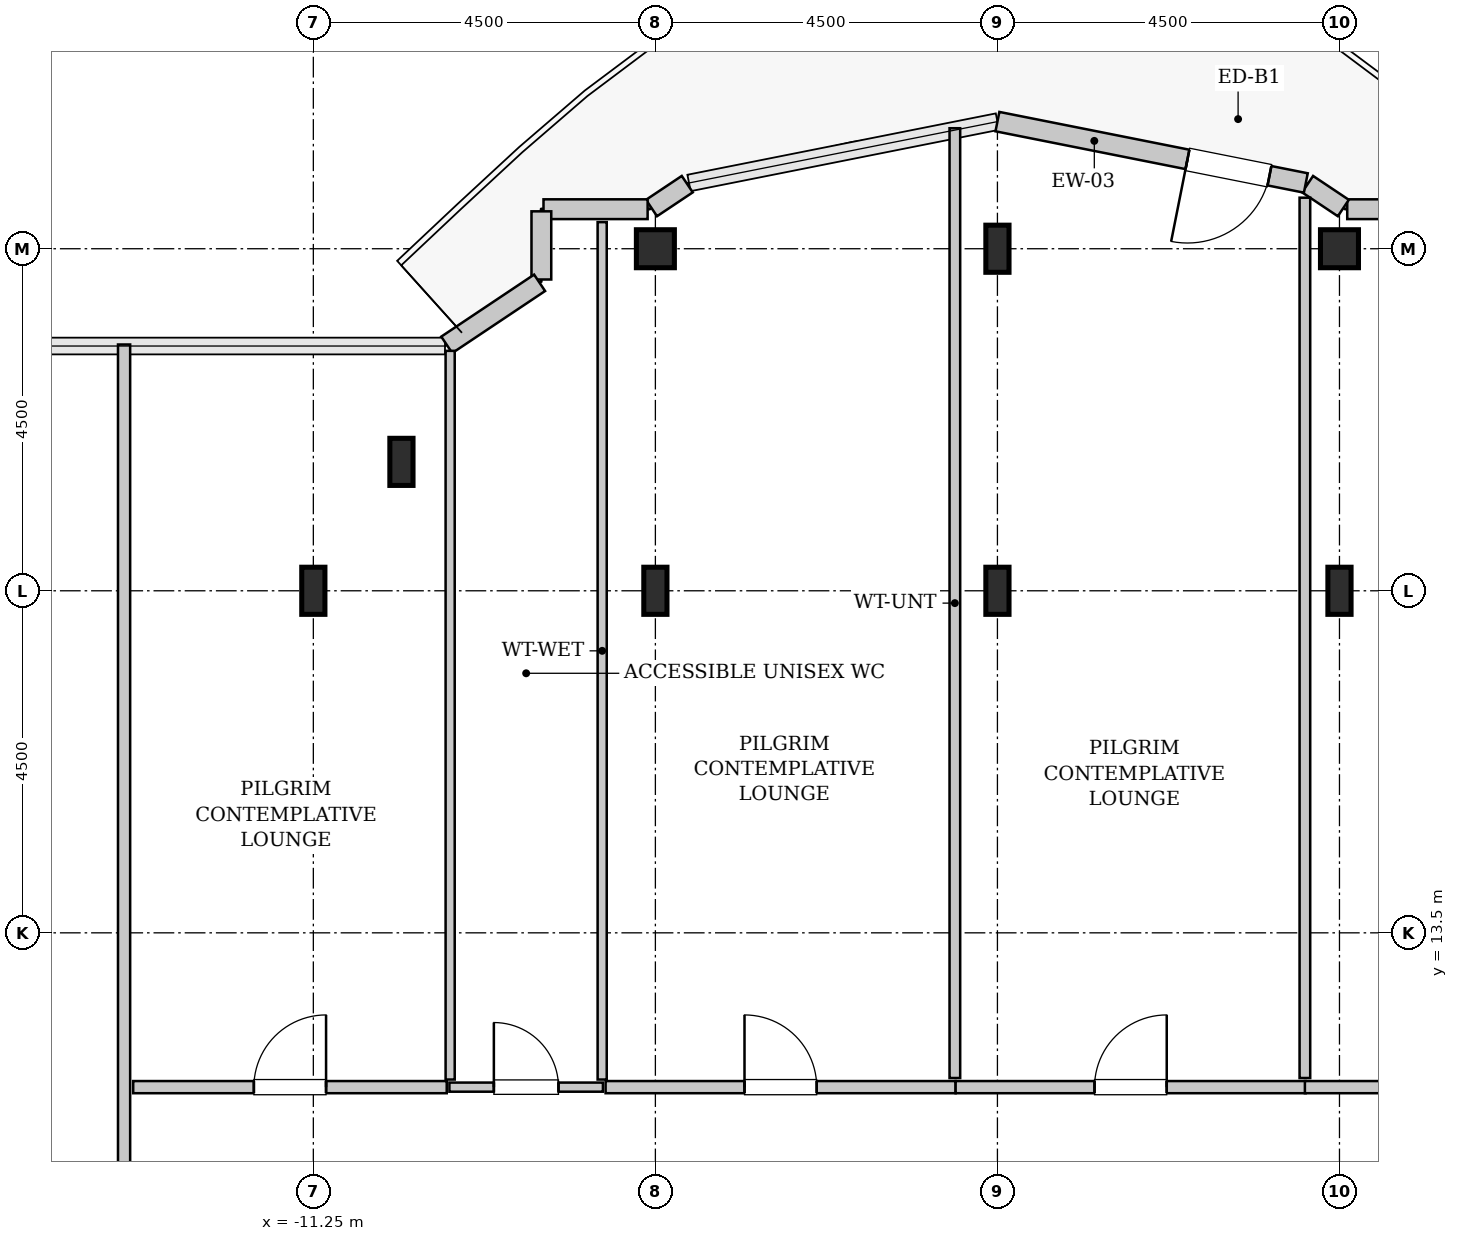
"""IFC4 building model, lengths in metres.
Left out: names, types, materials, properties, quantities, classifications, styles, units other than length and angle.
Written with IfcOpenShell. Run it as: python <this file> out.ifc"""

import sys

from ifc_helpers import new_model, si_unit, direction, frame, frame_2d, origin, origin_2d, place, context, subcontext, project, spatial, rectangle, hollow_rectangle, i_section, extrude, source, transform, mapped, element, fill, save


model = new_model("IFC4")
c1 = context("Model", 3, precision=1e-05, world=origin(), true_north=direction((0.0, 1.0)))
c2 = subcontext(c1, "Body", "Model", "MODEL_VIEW")
j1 = project(units=[si_unit("LENGTHUNIT", "METRE"), si_unit("PLANEANGLEUNIT", "RADIAN")], contexts=[c1])
p1 = place(None, origin())
s1 = spatial("IfcSite", under=j1, at=p1, CompositionType="ELEMENT")
p2 = place(p1, origin())
s2 = spatial("IfcBuilding", under=s1, at=p2, CompositionType="ELEMENT")
p3 = place(p2, frame((0.0, 0.0, 291.2)))
s3 = spatial("IfcBuildingStorey", under=s2, at=p3, CompositionType="ELEMENT", Elevation=291.2)
m1 = source(origin(), c2, "Body", "SweptSolid", [
    extrude(i_section(OverallWidth=0.305, OverallDepth=0.62, WebThickness=0.021, FlangeThickness=0.04, FilletRadius=0.027, at=origin_2d()), origin(), (0.0, 0.0, 1.0), 3.8),
])
for number, where, z_axis, x_axis in (
    (1, (-11.25, 18.0, 0.0), (0.0, 0.0, 1.0), (1.0, 0.0, 0.0)),
    (2, (-10.091, 19.696, 0.0), (0.0, 0.0, 1.0), (1.0, 0.0, 0.0)),
    (3, (-6.75, 18.0, 0.0), (0.0, 0.0, 1.0), (1.0, 0.0, 0.0)),
):
    element("IfcColumn", number, at=place(p3, frame(where, z_axis=z_axis, x_axis=x_axis)), inside=s3, PredefinedType="COLUMN", context=c2, shape_type="MappedRepresentation", body=[
        mapped(m1, transform((0.0, 0.0, 0.0), x_axis=(1.0, 0.0, 0.0), y_axis=(0.0, 1.0, 0.0), z_axis=(0.0, 0.0, 1.0), scale=1.0)),
    ])
m2 = source(origin(), c2, "Body", "SweptSolid", [
    extrude(hollow_rectangle(XDim=0.5, YDim=0.5, WallThickness=0.025, InnerFilletRadius=0.025, OuterFilletRadius=0.05, at=origin_2d()), origin(), (0.0, 0.0, 1.0), 3.8),
])
p4 = place(p3, frame((-6.75, 22.5, 0.0), z_axis=(0.0, 0.0, 1.0), x_axis=(1.0, 0.0, 0.0)))
e4 = element("IfcColumn", 4, at=p4, inside=s3, PredefinedType="COLUMN", context=c2, shape_type="MappedRepresentation", body=[
    mapped(m2, transform((0.0, 0.0, 0.0), x_axis=(1.0, 0.0, 0.0), y_axis=(0.0, 1.0, 0.0), z_axis=(0.0, 0.0, 1.0), scale=1.0)),
])
for number, where, z_axis, x_axis in (
    (5, (-2.25, 18.0, 0.0), (0.0, 0.0, 1.0), (1.0, 0.0, 0.0)),
    (6, (-2.25, 22.5, 0.0), (0.0, 0.0, 1.0), (1.0, 0.0, 0.0)),
    (7, (2.25, 18.0, 0.0), (0.0, 0.0, 1.0), (1.0, 0.0, 0.0)),
):
    element("IfcColumn", number, at=place(p3, frame(where, z_axis=z_axis, x_axis=x_axis)), inside=s3, PredefinedType="COLUMN", context=c2, shape_type="MappedRepresentation", body=[
        mapped(m1, transform((0.0, 0.0, 0.0), x_axis=(1.0, 0.0, 0.0), y_axis=(0.0, 1.0, 0.0), z_axis=(0.0, 0.0, 1.0), scale=1.0)),
    ])
p5 = place(p3, frame((2.25, 22.5, 0.0), z_axis=(0.0, 0.0, 1.0), x_axis=(1.0, 0.0, 0.0)))
e8 = element("IfcColumn", 8, at=p5, inside=s3, PredefinedType="COLUMN", context=c2, shape_type="MappedRepresentation", body=[
    mapped(m2, transform((0.0, 0.0, 0.0), x_axis=(1.0, 0.0, 0.0), y_axis=(0.0, 1.0, 0.0), z_axis=(0.0, 0.0, 1.0), scale=1.0)),
])
m3 = source(origin(), c2, "Body", "SweptSolid", [
    extrude(rectangle(XDim=1.37, YDim=0.26, at=frame_2d((0.685, 0.0))), origin(), (0.0, 0.0, 1.0), 3.55),
])
p6 = place(p3, frame((3.722, 23.02, 0.0), z_axis=(0.0, 0.0, 1.0), x_axis=(-1.0, 0.0, 0.0)))
e9 = element("IfcWall", 9, at=p6, inside=s3, PredefinedType="SOLIDWALL", context=c2, shape_type="MappedRepresentation", body=[
    mapped(m3, transform((0.0, 0.0, 0.0), x_axis=(1.0, 0.0, 0.0), y_axis=(0.0, 1.0, 0.0), z_axis=(0.0, 0.0, 1.0), scale=1.0)),
])
m4 = source(origin(), c2, "Body", "SweptSolid", [
    extrude(rectangle(XDim=0.565, YDim=0.26, at=frame_2d((0.283, 0.0))), origin(), (0.0, 0.0, 1.0), 3.55),
])
p7 = place(p3, frame((2.301, 23.036, 0.0), z_axis=(0.0, 0.0, 1.0), x_axis=(-0.831651492666, 0.555297933317, 0.0)))
e10 = element("IfcWall", 10, at=p7, inside=s3, PredefinedType="SOLIDWALL", context=c2, shape_type="MappedRepresentation", body=[
    mapped(m4, transform((0.0, 0.0, 0.0), x_axis=(1.0, 0.0, 0.0), y_axis=(0.0, 1.0, 0.0), z_axis=(0.0, 0.0, 1.0), scale=1.0)),
])
m5 = source(origin(), c2, "Body", "SweptSolid", [
    extrude(rectangle(XDim=4.137, YDim=0.26, at=frame_2d((2.068, 0.0))), origin(), (0.0, 0.0, 1.0), 3.55),
])
p8 = place(p3, frame((1.807, 23.365, 0.0), z_axis=(0.0, 0.0, 1.0), x_axis=(-0.980782170794, 0.195105954428, 0.0)))
e11 = element("IfcWall", 11, at=p8, inside=s3, PredefinedType="SOLIDWALL", context=c2, shape_type="MappedRepresentation", body=[
    mapped(m5, transform((0.0, 0.0, 0.0), x_axis=(1.0, 0.0, 0.0), y_axis=(0.0, 1.0, 0.0), z_axis=(0.0, 0.0, 1.0), scale=1.0)),
])
p9 = place(p8, frame((0.488, 0.0, 0.0)))
e12 = element("IfcOpeningElement", 12, at=p9, cuts=e11, PredefinedType="OPENING", context=c2, shape_type="SweptSolid", body=[
    extrude(rectangle(XDim=1.1, YDim=2.2, at=frame_2d((0.55, 1.1))), frame((0.0, 0.14, 0.0), z_axis=(0.0, -1.0, 0.0), x_axis=(1.0, 0.0, 0.0)), (0.0, 0.0, 1.0), 0.28),
])
p10 = place(p3, frame((-6.331, 23.35, 0.0), z_axis=(0.0, 0.0, 1.0), x_axis=(-0.831651492666, -0.555297933317, 0.0)))
e13 = element("IfcWall", 13, at=p10, inside=s3, PredefinedType="SOLIDWALL", context=c2, shape_type="MappedRepresentation", body=[
    mapped(m4, transform((0.0, 0.0, 0.0), x_axis=(1.0, 0.0, 0.0), y_axis=(0.0, 1.0, 0.0), z_axis=(0.0, 0.0, 1.0), scale=1.0)),
])
p11 = place(p3, frame((-6.852, 23.02, 0.0), z_axis=(0.0, 0.0, 1.0), x_axis=(-1.0, 0.0, 0.0)))
e14 = element("IfcWall", 14, at=p11, inside=s3, PredefinedType="SOLIDWALL", context=c2, shape_type="MappedRepresentation", body=[
    mapped(m3, transform((0.0, 0.0, 0.0), x_axis=(1.0, 0.0, 0.0), y_axis=(0.0, 1.0, 0.0), z_axis=(0.0, 0.0, 1.0), scale=1.0)),
])
m6 = source(origin(), c2, "Body", "SweptSolid", [
    extrude(rectangle(XDim=0.897, YDim=0.26, at=frame_2d((0.448, 0.0))), origin(), (0.0, 0.0, 1.0), 3.55),
])
p12 = place(p3, frame((-8.25, 22.992, 0.0), z_axis=(0.0, 0.0, 1.0), x_axis=(0.0, -1.0, 0.0)))
e15 = element("IfcWall", 15, at=p12, inside=s3, PredefinedType="SOLIDWALL", context=c2, shape_type="MappedRepresentation", body=[
    mapped(m6, transform((0.0, 0.0, 0.0), x_axis=(1.0, 0.0, 0.0), y_axis=(0.0, 1.0, 0.0), z_axis=(0.0, 0.0, 1.0), scale=1.0)),
])
m7 = source(origin(), c2, "Body", "SweptSolid", [
    extrude(rectangle(XDim=1.469, YDim=0.26, at=frame_2d((0.734, 0.0))), origin(), (0.0, 0.0, 1.0), 3.55),
])
p13 = place(p3, frame((-8.273, 22.052, 0.0), z_axis=(0.0, 0.0, 1.0), x_axis=(-0.831461760506, -0.555581983884, 0.0)))
e16 = element("IfcWall", 16, at=p13, inside=s3, PredefinedType="SOLIDWALL", context=c2, shape_type="MappedRepresentation", body=[
    mapped(m7, transform((0.0, 0.0, 0.0), x_axis=(1.0, 0.0, 0.0), y_axis=(0.0, 1.0, 0.0), z_axis=(0.0, 0.0, 1.0), scale=1.0)),
])
m8 = source(origin(), c2, "Body", "SweptSolid", [
    extrude(rectangle(XDim=2.02, YDim=0.12, at=frame_2d((1.01, 0.0))), origin(), (0.0, 0.0, 1.0), 3.535),
])
p14 = place(p3, frame((-9.46, 11.47, 0.0), z_axis=(0.0, 0.0, 1.0), x_axis=(1.0, 0.0, 0.0)))
e17 = element("IfcWall", 17, at=p14, inside=s3, PredefinedType="PLUMBINGWALL", context=c2, shape_type="MappedRepresentation", body=[
    mapped(m8, transform((0.0, 0.0, 0.0), x_axis=(1.0, 0.0, 0.0), y_axis=(0.0, 1.0, 0.0), z_axis=(0.0, 0.0, 1.0), scale=1.0)),
])
p15 = place(p14, frame((0.585, 0.0, 0.0)))
e18 = element("IfcOpeningElement", 18, at=p15, cuts=e17, PredefinedType="OPENING", context=c2, shape_type="SweptSolid", body=[
    extrude(rectangle(XDim=0.85, YDim=2.1, at=frame_2d((0.425, 1.05))), frame((0.0, 0.07, 0.0), z_axis=(0.0, -1.0, 0.0), x_axis=(1.0, 0.0, 0.0)), (0.0, 0.0, 1.0), 0.14),
])
m9 = source(origin(), c2, "Body", "SweptSolid", [
    extrude(rectangle(XDim=11.28, YDim=0.12, at=frame_2d((5.64, 0.0))), origin(), (0.0, 0.0, 1.0), 3.535),
])
p16 = place(p3, frame((-7.45, 11.57, 0.0), z_axis=(0.0, 0.0, 1.0), x_axis=(0.0, 1.0, 0.0)))
e19 = element("IfcWall", 19, at=p16, inside=s3, PredefinedType="PLUMBINGWALL", context=c2, shape_type="MappedRepresentation", body=[
    mapped(m9, transform((0.0, 0.0, 0.0), x_axis=(1.0, 0.0, 0.0), y_axis=(0.0, 1.0, 0.0), z_axis=(0.0, 0.0, 1.0), scale=1.0)),
])
m10 = source(origin(), c2, "Body", "SweptSolid", [
    extrude(rectangle(XDim=9.587, YDim=0.12, at=frame_2d((4.793, 0.0))), origin(), (0.0, 0.0, 1.0), 3.535),
])
p17 = place(p3, frame((-9.45, 11.57, 0.0), z_axis=(0.0, 0.0, 1.0), x_axis=(0.0, 1.0, 0.0)))
e20 = element("IfcWall", 20, at=p17, inside=s3, PredefinedType="PLUMBINGWALL", context=c2, shape_type="MappedRepresentation", body=[
    mapped(m10, transform((0.0, 0.0, 0.0), x_axis=(1.0, 0.0, 0.0), y_axis=(0.0, 1.0, 0.0), z_axis=(0.0, 0.0, 1.0), scale=1.0)),
])
m11 = source(origin(), c2, "Body", "SweptSolid", [
    extrude(rectangle(XDim=12.752, YDim=0.16, at=frame_2d((6.376, 0.0))), origin(), (0.0, 0.0, 1.0), 3.535),
])
p18 = place(p3, frame((-13.74, 8.488, 0.0), z_axis=(0.0, 0.0, 1.0), x_axis=(0.0, 1.0, 0.0)))
e21 = element("IfcWall", 21, at=p18, inside=s3, PredefinedType="PARTITIONING", context=c2, shape_type="MappedRepresentation", body=[
    mapped(m11, transform((0.0, 0.0, 0.0), x_axis=(1.0, 0.0, 0.0), y_axis=(0.0, 1.0, 0.0), z_axis=(0.0, 0.0, 1.0), scale=1.0)),
])
p19 = place(p18, frame((1.036, 0.0, 0.0)))
e22 = element("IfcOpeningElement", 22, at=p19, cuts=e21, PredefinedType="OPENING", context=c2, shape_type="SweptSolid", body=[
    extrude(rectangle(XDim=0.95, YDim=2.1, at=frame_2d((0.475, 1.05))), frame((0.0, 0.09, 0.0), z_axis=(0.0, -1.0, 0.0), x_axis=(1.0, 0.0, 0.0)), (0.0, 0.0, 1.0), 0.18),
])
m12 = source(origin(), c2, "Body", "SweptSolid", [
    extrude(rectangle(XDim=4.125, YDim=0.16, at=frame_2d((2.062, 0.0))), origin(), (0.0, 0.0, 1.0), 3.535),
])
p20 = place(p3, frame((-13.62, 11.47, 0.0), z_axis=(0.0, 0.0, 1.0), x_axis=(1.0, 0.0, 0.0)))
e23 = element("IfcWall", 23, at=p20, inside=s3, PredefinedType="PARTITIONING", context=c2, shape_type="MappedRepresentation", body=[
    mapped(m12, transform((0.0, 0.0, 0.0), x_axis=(1.0, 0.0, 0.0), y_axis=(0.0, 1.0, 0.0), z_axis=(0.0, 0.0, 1.0), scale=1.0)),
])
p21 = place(p20, frame((1.587, 0.0, 0.0)))
e24 = element("IfcOpeningElement", 24, at=p21, cuts=e23, PredefinedType="OPENING", context=c2, shape_type="SweptSolid", body=[
    extrude(rectangle(XDim=0.95, YDim=2.1, at=frame_2d((0.475, 1.05))), frame((0.0, 0.09, 0.0), z_axis=(0.0, -1.0, 0.0), x_axis=(1.0, 0.0, 0.0)), (0.0, 0.0, 1.0), 0.18),
])
m13 = source(origin(), c2, "Body", "SweptSolid", [
    extrude(rectangle(XDim=4.605, YDim=0.16, at=frame_2d((2.302, 0.0))), origin(), (0.0, 0.0, 1.0), 3.535),
])
p22 = place(p3, frame((-7.405, 11.47, 0.0), z_axis=(0.0, 0.0, 1.0), x_axis=(1.0, 0.0, 0.0)))
e25 = element("IfcWall", 25, at=p22, inside=s3, PredefinedType="PARTITIONING", context=c2, shape_type="MappedRepresentation", body=[
    mapped(m13, transform((0.0, 0.0, 0.0), x_axis=(1.0, 0.0, 0.0), y_axis=(0.0, 1.0, 0.0), z_axis=(0.0, 0.0, 1.0), scale=1.0)),
])
p23 = place(p22, frame((1.827, 0.0, 0.0)))
e26 = element("IfcOpeningElement", 26, at=p23, cuts=e25, PredefinedType="OPENING", context=c2, shape_type="SweptSolid", body=[
    extrude(rectangle(XDim=0.95, YDim=2.1, at=frame_2d((0.475, 1.05))), frame((0.0, 0.09, 0.0), z_axis=(0.0, -1.0, 0.0), x_axis=(1.0, 0.0, 0.0)), (0.0, 0.0, 1.0), 0.18),
])
m14 = source(origin(), c2, "Body", "SweptSolid", [
    extrude(rectangle(XDim=12.495, YDim=0.14, at=frame_2d((6.248, 0.0))), origin(), (0.0, 0.0, 1.0), 3.535),
])
p24 = place(p3, frame((-2.81, 11.59, 0.0), z_axis=(0.0, 0.0, 1.0), x_axis=(0.0, 1.0, 0.0)))
e27 = element("IfcWall", 27, at=p24, inside=s3, PredefinedType="PARTITIONING", context=c2, shape_type="MappedRepresentation", body=[
    mapped(m14, transform((0.0, 0.0, 0.0), x_axis=(1.0, 0.0, 0.0), y_axis=(0.0, 1.0, 0.0), z_axis=(0.0, 0.0, 1.0), scale=1.0)),
])
p25 = place(p3, frame((-2.8, 11.47, 0.0), z_axis=(0.0, 0.0, 1.0), x_axis=(1.0, 0.0, 0.0)))
e28 = element("IfcWall", 28, at=p25, inside=s3, PredefinedType="PARTITIONING", context=c2, shape_type="MappedRepresentation", body=[
    mapped(m13, transform((0.0, 0.0, 0.0), x_axis=(1.0, 0.0, 0.0), y_axis=(0.0, 1.0, 0.0), z_axis=(0.0, 0.0, 1.0), scale=1.0)),
])
p26 = place(p25, frame((1.827, 0.0, 0.0)))
e29 = element("IfcOpeningElement", 29, at=p26, cuts=e28, PredefinedType="OPENING", context=c2, shape_type="SweptSolid", body=[
    extrude(rectangle(XDim=0.95, YDim=2.1, at=frame_2d((0.475, 1.05))), frame((0.0, 0.09, 0.0), z_axis=(0.0, -1.0, 0.0), x_axis=(1.0, 0.0, 0.0)), (0.0, 0.0, 1.0), 0.18),
])
m15 = source(origin(), c2, "Body", "SweptSolid", [
    extrude(rectangle(XDim=11.581, YDim=0.14, at=frame_2d((5.791, 0.0))), origin(), (0.0, 0.0, 1.0), 2.925),
])
p27 = place(p3, frame((1.795, 11.59, 0.0), z_axis=(0.0, 0.0, 1.0), x_axis=(0.0, 1.0, 0.0)))
e30 = element("IfcWall", 30, at=p27, inside=s3, PredefinedType="PARTITIONING", context=c2, shape_type="MappedRepresentation", body=[
    mapped(m15, transform((0.0, 0.0, 0.0), x_axis=(1.0, 0.0, 0.0), y_axis=(0.0, 1.0, 0.0), z_axis=(0.0, 0.0, 1.0), scale=1.0)),
])
m16 = source(origin(), c2, "Body", "SweptSolid", [
    extrude(rectangle(XDim=6.01, YDim=0.16, at=frame_2d((3.005, 0.0))), origin(), (0.0, 0.0, 1.0), 3.535),
])
p28 = place(p3, frame((1.795, 11.47, 0.0), z_axis=(0.0, 0.0, 1.0), x_axis=(1.0, 0.0, 0.0)))
e31 = element("IfcWall", 31, at=p28, inside=s3, PredefinedType="PARTITIONING", context=c2, shape_type="MappedRepresentation", body=[
    mapped(m16, transform((0.0, 0.0, 0.0), x_axis=(1.0, 0.0, 0.0), y_axis=(0.0, 1.0, 0.0), z_axis=(0.0, 0.0, 1.0), scale=1.0)),
])
p29 = place(p28, frame((2.53, 0.0, 0.0)))
e32 = element("IfcOpeningElement", 32, at=p29, cuts=e31, PredefinedType="OPENING", context=c2, shape_type="SweptSolid", body=[
    extrude(rectangle(XDim=0.95, YDim=2.1, at=frame_2d((0.475, 1.05))), frame((0.0, 0.09, 0.0), z_axis=(0.0, -1.0, 0.0), x_axis=(1.0, 0.0, 0.0)), (0.0, 0.0, 1.0), 0.18),
])
m17 = source(origin(), c2, "Body", "SweptSolid", [
    extrude(rectangle(XDim=1.1, YDim=2.2, at=frame_2d((0.55, 1.1))), frame((0.0, 0.025, 0.0), z_axis=(0.0, -1.0, 0.0), x_axis=(1.0, 0.0, 0.0)), (0.0, 0.0, 1.0), 0.05),
])
p30 = place(p9, origin())
e33 = element("IfcDoor", 33, at=p30, inside=s3, OperationType="SINGLE_SWING_RIGHT", PredefinedType="DOOR", context=c2, shape_type="MappedRepresentation", body=[
    mapped(m17, transform((0.0, 0.0, 0.0), x_axis=(1.0, 0.0, 0.0), y_axis=(0.0, 1.0, 0.0), z_axis=(0.0, 0.0, 1.0), scale=1.0)),
])
fill(e12, e33)
m18 = source(origin(), c2, "Body", "SweptSolid", [
    extrude(rectangle(XDim=0.85, YDim=2.1, at=frame_2d((0.425, 1.05))), frame((0.0, 0.025, 0.0), z_axis=(0.0, -1.0, 0.0), x_axis=(1.0, 0.0, 0.0)), (0.0, 0.0, 1.0), 0.05),
])
p31 = place(p15, origin())
e34 = element("IfcDoor", 34, at=p31, inside=s3, OperationType="SINGLE_SWING_LEFT", PredefinedType="DOOR", context=c2, shape_type="MappedRepresentation", body=[
    mapped(m18, transform((0.0, 0.0, 0.0), x_axis=(1.0, 0.0, 0.0), y_axis=(0.0, 1.0, 0.0), z_axis=(0.0, 0.0, 1.0), scale=1.0)),
])
fill(e18, e34)
m19 = source(origin(), c2, "Body", "SweptSolid", [
    extrude(rectangle(XDim=0.95, YDim=2.1, at=frame_2d((0.475, 1.05))), frame((0.0, 0.025, 0.0), z_axis=(0.0, -1.0, 0.0), x_axis=(1.0, 0.0, 0.0)), (0.0, 0.0, 1.0), 0.05),
])
p32 = place(p21, origin())
e35 = element("IfcDoor", 35, at=p32, inside=s3, OperationType="SINGLE_SWING_RIGHT", PredefinedType="DOOR", context=c2, shape_type="MappedRepresentation", body=[
    mapped(m19, transform((0.0, 0.0, 0.0), x_axis=(1.0, 0.0, 0.0), y_axis=(0.0, 1.0, 0.0), z_axis=(0.0, 0.0, 1.0), scale=1.0)),
])
fill(e24, e35)
p33 = place(p23, origin())
e36 = element("IfcDoor", 36, at=p33, inside=s3, OperationType="SINGLE_SWING_LEFT", PredefinedType="DOOR", context=c2, shape_type="MappedRepresentation", body=[
    mapped(m19, transform((0.0, 0.0, 0.0), x_axis=(1.0, 0.0, 0.0), y_axis=(0.0, 1.0, 0.0), z_axis=(0.0, 0.0, 1.0), scale=1.0)),
])
fill(e26, e36)
p34 = place(p26, origin())
e37 = element("IfcDoor", 37, at=p34, inside=s3, OperationType="SINGLE_SWING_RIGHT", PredefinedType="DOOR", context=c2, shape_type="MappedRepresentation", body=[
    mapped(m19, transform((0.0, 0.0, 0.0), x_axis=(1.0, 0.0, 0.0), y_axis=(0.0, 1.0, 0.0), z_axis=(0.0, 0.0, 1.0), scale=1.0)),
])
fill(e29, e37)
save(model, sys.argv[1])
